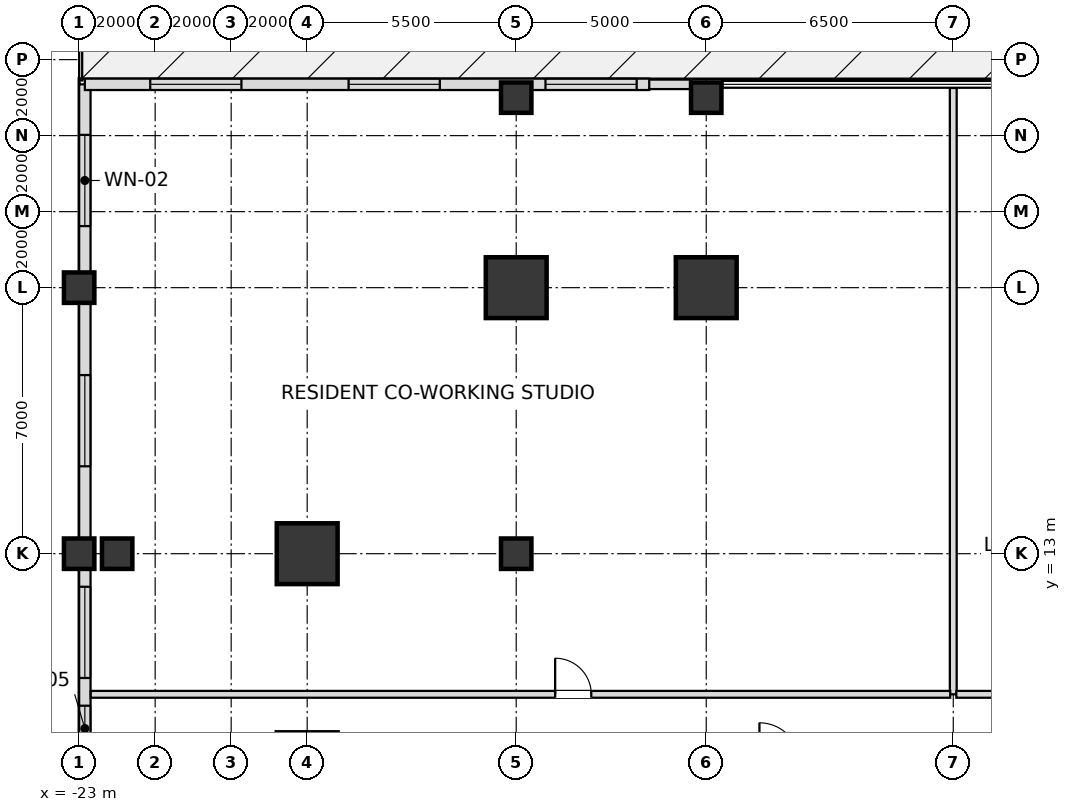
"""IFC4 building model, lengths in metres.
Left out: names, types, materials, properties, quantities, classifications, styles, units other than length and angle.
Written with IfcOpenShell. Run it as: python <this file> out.ifc"""

import sys

from ifc_helpers import new_model, si_unit, direction, frame, frame_2d, origin, origin_2d, place, context, subcontext, project, spatial, rectangle, extrude, element, fill, save


model = new_model("IFC4")
c1 = context("Model", 3, precision=1e-05, world=origin(), true_north=direction((0.0, 1.0)))
c2 = subcontext(c1, "Body", "Model", "MODEL_VIEW")
j1 = project(units=[si_unit("LENGTHUNIT", "METRE"), si_unit("PLANEANGLEUNIT", "RADIAN")], contexts=[c1])
p1 = place(None, origin())
s1 = spatial("IfcSite", under=j1, at=p1, CompositionType="ELEMENT")
p2 = place(p1, origin())
s2 = spatial("IfcBuilding", under=s1, at=p2, CompositionType="ELEMENT")
p3 = place(p2, frame((0.0, 0.0, 6.0)))
s3 = spatial("IfcBuildingStorey", under=s2, at=p3, CompositionType="ELEMENT", Elevation=6.0)
for number, where, z_axis, x_axis in (
    (1, (-6.5, 20.0, 0.0), (0.0, 0.0, 1.0), (1.0, 0.0, 0.0)),
    (2, (-11.5, 20.0, 0.0), (0.0, 0.0, 1.0), (1.0, 0.0, 0.0)),
    (3, (-17.0, 13.0, 0.0), (0.0, 0.0, 1.0), (1.0, 0.0, 0.0)),
):
    element("IfcColumn", number, at=place(p3, frame(where, z_axis=z_axis, x_axis=x_axis)), inside=s3, PredefinedType="USERDEFINED", context=c2, shape_type="SweptSolid", body=[
        extrude(rectangle(XDim=1.6, YDim=1.6, at=origin_2d()), origin(), (0.0, 0.0, 1.0), 5.4),
    ])
for number, where, z_axis, x_axis in (
    (4, (-23.0, 13.0, 0.0), (0.0, 0.0, 1.0), (1.0, 0.0, 0.0)),
    (5, (-23.0, 20.0, 0.0), (0.0, 0.0, 1.0), (1.0, 0.0, 0.0)),
    (6, (-11.5, 13.0, 0.0), (0.0, 0.0, 1.0), (1.0, 0.0, 0.0)),
    (7, (-22.0, 13.0, 0.0), (0.0, 0.0, 1.0), (1.0, 0.0, 0.0)),
    (8, (-11.5, 25.0, 0.0), (0.0, 0.0, 1.0), (1.0, 0.0, 0.0)),
    (9, (-6.5, 25.0, 0.0), (0.0, 0.0, 1.0), (1.0, 0.0, 0.0)),
):
    element("IfcColumn", number, at=place(p3, frame(where, z_axis=z_axis, x_axis=x_axis)), inside=s3, PredefinedType="COLUMN", context=c2, shape_type="SweptSolid", body=[
        extrude(rectangle(XDim=0.8, YDim=0.8, at=origin_2d()), origin(), (0.0, 0.0, 1.0), 5.4),
    ])
p4 = place(p3, frame((-22.85, 25.35, 0.0), z_axis=(0.0, 0.0, 1.0), x_axis=(0.0, -1.0, 0.0)))
e10 = element("IfcWall", 10, at=p4, inside=s3, PredefinedType="SOLIDWALL", context=c2, shape_type="SweptSolid", body=[
    extrude(rectangle(XDim=50.7, YDim=0.3, at=frame_2d((25.35, 0.0))), origin(), (0.0, 0.0, 1.0), 4.476),
])
p5 = place(p4, frame((1.33, 0.0, 0.8)))
e11 = element("IfcOpeningElement", 11, at=p5, cuts=e10, PredefinedType="OPENING", context=c2, shape_type="SweptSolid", body=[
    extrude(rectangle(XDim=2.4, YDim=2.2, at=frame_2d((1.2, 1.1))), frame((0.0, 0.16, 0.0), z_axis=(0.0, -1.0, 0.0), x_axis=(1.0, 0.0, 0.0)), (0.0, 0.0, 1.0), 0.32),
])
p6 = place(p4, frame((7.65, 0.0, 0.8)))
e12 = element("IfcOpeningElement", 12, at=p6, cuts=e10, PredefinedType="OPENING", context=c2, shape_type="SweptSolid", body=[
    extrude(rectangle(XDim=2.4, YDim=2.2, at=frame_2d((1.2, 1.1))), frame((0.0, 0.16, 0.0), z_axis=(0.0, -1.0, 0.0), x_axis=(1.0, 0.0, 0.0)), (0.0, 0.0, 1.0), 0.32),
])
p7 = place(p4, frame((13.22, 0.0, 0.8)))
e13 = element("IfcOpeningElement", 13, at=p7, cuts=e10, PredefinedType="OPENING", context=c2, shape_type="SweptSolid", body=[
    extrude(rectangle(XDim=2.4, YDim=2.2, at=frame_2d((1.2, 1.1))), frame((0.0, 0.16, 0.0), z_axis=(0.0, -1.0, 0.0), x_axis=(1.0, 0.0, 0.0)), (0.0, 0.0, 1.0), 0.32),
])
p8 = place(p4, frame((16.35, 0.0, 0.72)))
e14 = element("IfcOpeningElement", 14, at=p8, cuts=e10, PredefinedType="OPENING", context=c2, shape_type="SweptSolid", body=[
    extrude(rectangle(XDim=1.2, YDim=1.68, at=frame_2d((0.6, 0.84))), frame((0.0, 0.16, 0.0), z_axis=(0.0, -1.0, 0.0), x_axis=(1.0, 0.0, 0.0)), (0.0, 0.0, 1.0), 0.32),
])
p9 = place(p4, frame((18.495, 0.0, 0.8)))
e15 = element("IfcOpeningElement", 15, at=p9, cuts=e10, PredefinedType="OPENING", context=c2, shape_type="SweptSolid", body=[
    extrude(rectangle(XDim=2.4, YDim=2.2, at=frame_2d((1.2, 1.1))), frame((0.0, 0.16, 0.0), z_axis=(0.0, -1.0, 0.0), x_axis=(1.0, 0.0, 0.0)), (0.0, 0.0, 1.0), 0.32),
])
p10 = place(p4, frame((21.865, 0.0, 0.8)))
e16 = element("IfcOpeningElement", 16, at=p10, cuts=e10, PredefinedType="OPENING", context=c2, shape_type="SweptSolid", body=[
    extrude(rectangle(XDim=2.4, YDim=2.2, at=frame_2d((1.2, 1.1))), frame((0.0, 0.16, 0.0), z_axis=(0.0, -1.0, 0.0), x_axis=(1.0, 0.0, 0.0)), (0.0, 0.0, 1.0), 0.32),
])
p11 = place(p4, frame((26.435, 0.0, 0.8)))
e17 = element("IfcOpeningElement", 17, at=p11, cuts=e10, PredefinedType="OPENING", context=c2, shape_type="SweptSolid", body=[
    extrude(rectangle(XDim=2.4, YDim=2.2, at=frame_2d((1.2, 1.1))), frame((0.0, 0.16, 0.0), z_axis=(0.0, -1.0, 0.0), x_axis=(1.0, 0.0, 0.0)), (0.0, 0.0, 1.0), 0.32),
])
p12 = place(p4, frame((29.805, 0.0, 0.8)))
e18 = element("IfcOpeningElement", 18, at=p12, cuts=e10, PredefinedType="OPENING", context=c2, shape_type="SweptSolid", body=[
    extrude(rectangle(XDim=2.4, YDim=2.2, at=frame_2d((1.2, 1.1))), frame((0.0, 0.16, 0.0), z_axis=(0.0, -1.0, 0.0), x_axis=(1.0, 0.0, 0.0)), (0.0, 0.0, 1.0), 0.32),
])
p13 = place(p4, frame((33.15, 0.0, 0.72)))
e19 = element("IfcOpeningElement", 19, at=p13, cuts=e10, PredefinedType="OPENING", context=c2, shape_type="SweptSolid", body=[
    extrude(rectangle(XDim=1.2, YDim=1.68, at=frame_2d((0.6, 0.84))), frame((0.0, 0.16, 0.0), z_axis=(0.0, -1.0, 0.0), x_axis=(1.0, 0.0, 0.0)), (0.0, 0.0, 1.0), 0.32),
])
p14 = place(p4, frame((35.08, 0.0, 0.8)))
e20 = element("IfcOpeningElement", 20, at=p14, cuts=e10, PredefinedType="OPENING", context=c2, shape_type="SweptSolid", body=[
    extrude(rectangle(XDim=2.4, YDim=2.2, at=frame_2d((1.2, 1.1))), frame((0.0, 0.16, 0.0), z_axis=(0.0, -1.0, 0.0), x_axis=(1.0, 0.0, 0.0)), (0.0, 0.0, 1.0), 0.32),
])
p15 = place(p4, frame((40.47, 0.0, 0.8)))
e21 = element("IfcOpeningElement", 21, at=p15, cuts=e10, PredefinedType="OPENING", context=c2, shape_type="SweptSolid", body=[
    extrude(rectangle(XDim=2.4, YDim=2.2, at=frame_2d((1.2, 1.1))), frame((0.0, 0.16, 0.0), z_axis=(0.0, -1.0, 0.0), x_axis=(1.0, 0.0, 0.0)), (0.0, 0.0, 1.0), 0.32),
])
p16 = place(p4, frame((46.97, 0.0, 0.8)))
e22 = element("IfcOpeningElement", 22, at=p16, cuts=e10, PredefinedType="OPENING", context=c2, shape_type="SweptSolid", body=[
    extrude(rectangle(XDim=2.4, YDim=2.2, at=frame_2d((1.2, 1.1))), frame((0.0, 0.16, 0.0), z_axis=(0.0, -1.0, 0.0), x_axis=(1.0, 0.0, 0.0)), (0.0, 0.0, 1.0), 0.32),
])
p17 = place(p3, frame((-6.895, 25.35, 0.0), z_axis=(0.0, 0.0, 1.0), x_axis=(-1.0, 0.0, 0.0)))
e23 = element("IfcWall", 23, at=p17, inside=s3, PredefinedType="SOLIDWALL", context=c2, shape_type="SweptSolid", body=[
    extrude(rectangle(XDim=1.13, YDim=0.25, at=frame_2d((0.565, 0.0))), origin(), (0.0, 0.0, 1.0), 4.476),
])
p18 = place(p3, frame((-22.85, 25.35, 0.0), z_axis=(0.0, 0.0, 1.0), x_axis=(1.0, 0.0, 0.0)))
e24 = element("IfcWall", 24, at=p18, inside=s3, PredefinedType="SOLIDWALL", context=c2, shape_type="SweptSolid", body=[
    extrude(rectangle(XDim=14.85, YDim=0.3, at=frame_2d((7.425, 0.0))), origin(), (0.0, 0.0, 1.0), 4.476),
])
p19 = place(p18, frame((1.72, 0.0, 0.8)))
e25 = element("IfcOpeningElement", 25, at=p19, cuts=e24, PredefinedType="OPENING", context=c2, shape_type="SweptSolid", body=[
    extrude(rectangle(XDim=2.4, YDim=2.2, at=frame_2d((1.2, 1.1))), frame((0.0, 0.16, 0.0), z_axis=(0.0, -1.0, 0.0), x_axis=(1.0, 0.0, 0.0)), (0.0, 0.0, 1.0), 0.32),
])
p20 = place(p18, frame((6.94, 0.0, 0.8)))
e26 = element("IfcOpeningElement", 26, at=p20, cuts=e24, PredefinedType="OPENING", context=c2, shape_type="SweptSolid", body=[
    extrude(rectangle(XDim=2.4, YDim=2.2, at=frame_2d((1.2, 1.1))), frame((0.0, 0.16, 0.0), z_axis=(0.0, -1.0, 0.0), x_axis=(1.0, 0.0, 0.0)), (0.0, 0.0, 1.0), 0.32),
])
p21 = place(p18, frame((12.12, 0.0, 0.8)))
e27 = element("IfcOpeningElement", 27, at=p21, cuts=e24, PredefinedType="OPENING", context=c2, shape_type="SweptSolid", body=[
    extrude(rectangle(XDim=2.4, YDim=2.2, at=frame_2d((1.2, 1.1))), frame((0.0, 0.16, 0.0), z_axis=(0.0, -1.0, 0.0), x_axis=(1.0, 0.0, 0.0)), (0.0, 0.0, 1.0), 0.32),
])
p22 = place(p3, frame((0.0, 9.3, 0.0), z_axis=(0.0, 0.0, 1.0), x_axis=(0.0, 1.0, 0.0)))
e28 = element("IfcWall", 28, at=p22, inside=s3, PredefinedType="PARTITIONING", context=c2, shape_type="SweptSolid", body=[
    extrude(rectangle(XDim=15.955, YDim=0.18, at=frame_2d((7.978, 0.0))), origin(), (0.0, 0.0, 1.0), 4.476),
])
p23 = place(p3, frame((-22.695, 9.3, 0.0), z_axis=(0.0, 0.0, 1.0), x_axis=(1.0, 0.0, 0.0)))
e29 = element("IfcWall", 29, at=p23, inside=s3, PredefinedType="PARTITIONING", context=c2, shape_type="SweptSolid", body=[
    extrude(rectangle(XDim=22.615, YDim=0.18, at=frame_2d((11.308, 0.0))), origin(), (0.0, 0.0, 1.0), 4.41),
])
p24 = place(p23, frame((12.22, 0.0, 0.0)))
e30 = element("IfcOpeningElement", 30, at=p24, cuts=e29, PredefinedType="OPENING", context=c2, shape_type="SweptSolid", body=[
    extrude(rectangle(XDim=0.95, YDim=2.15, at=frame_2d((0.475, 1.075))), frame((0.0, 0.1, 0.0), z_axis=(0.0, -1.0, 0.0), x_axis=(1.0, 0.0, 0.0)), (0.0, 0.0, 1.0), 0.2),
])
p25 = place(p3, frame((0.08, 9.3, 0.0), z_axis=(0.0, 0.0, 1.0), x_axis=(1.0, 0.0, 0.0)))
e31 = element("IfcWall", 31, at=p25, inside=s3, PredefinedType="PARTITIONING", context=c2, shape_type="SweptSolid", body=[
    extrude(rectangle(XDim=13.84, YDim=0.18, at=frame_2d((6.92, 0.0))), origin(), (0.0, 0.0, 1.0), 4.41),
])
p26 = place(p25, frame((6.445, 0.0, 0.0)))
e32 = element("IfcOpeningElement", 32, at=p26, cuts=e31, PredefinedType="OPENING", context=c2, shape_type="SweptSolid", body=[
    extrude(rectangle(XDim=0.95, YDim=2.15, at=frame_2d((0.475, 1.075))), frame((0.0, 0.1, 0.0), z_axis=(0.0, -1.0, 0.0), x_axis=(1.0, 0.0, 0.0)), (0.0, 0.0, 1.0), 0.2),
])
p27 = place(p5, origin())
e33 = element("IfcWindow", 33, at=p27, inside=s3, PartitioningType="SINGLE_PANEL", PredefinedType="WINDOW", context=c2, shape_type="SweptSolid", body=[
    extrude(rectangle(XDim=2.4, YDim=2.2, at=frame_2d((1.2, 1.1))), frame((0.0, 0.03, 0.0), z_axis=(0.0, -1.0, 0.0), x_axis=(1.0, 0.0, 0.0)), (0.0, 0.0, 1.0), 0.06),
])
fill(e11, e33)
p28 = place(p6, origin())
e34 = element("IfcWindow", 34, at=p28, inside=s3, PartitioningType="SINGLE_PANEL", PredefinedType="WINDOW", context=c2, shape_type="SweptSolid", body=[
    extrude(rectangle(XDim=2.4, YDim=2.2, at=frame_2d((1.2, 1.1))), frame((0.0, 0.03, 0.0), z_axis=(0.0, -1.0, 0.0), x_axis=(1.0, 0.0, 0.0)), (0.0, 0.0, 1.0), 0.06),
])
fill(e12, e34)
p29 = place(p7, origin())
e35 = element("IfcWindow", 35, at=p29, inside=s3, PartitioningType="SINGLE_PANEL", PredefinedType="WINDOW", context=c2, shape_type="SweptSolid", body=[
    extrude(rectangle(XDim=2.4, YDim=2.2, at=frame_2d((1.2, 1.1))), frame((0.0, 0.03, 0.0), z_axis=(0.0, -1.0, 0.0), x_axis=(1.0, 0.0, 0.0)), (0.0, 0.0, 1.0), 0.06),
])
fill(e13, e35)
p30 = place(p8, origin())
e36 = element("IfcWindow", 36, at=p30, inside=s3, PartitioningType="SINGLE_PANEL", PredefinedType="WINDOW", context=c2, shape_type="SweptSolid", body=[
    extrude(rectangle(XDim=1.2, YDim=1.68, at=frame_2d((0.6, 0.84))), frame((0.0, 0.03, 0.0), z_axis=(0.0, -1.0, 0.0), x_axis=(1.0, 0.0, 0.0)), (0.0, 0.0, 1.0), 0.06),
])
fill(e14, e36)
p31 = place(p19, origin())
e37 = element("IfcWindow", 37, at=p31, inside=s3, PartitioningType="SINGLE_PANEL", PredefinedType="WINDOW", context=c2, shape_type="SweptSolid", body=[
    extrude(rectangle(XDim=2.4, YDim=2.2, at=frame_2d((1.2, 1.1))), frame((0.0, 0.03, 0.0), z_axis=(0.0, -1.0, 0.0), x_axis=(1.0, 0.0, 0.0)), (0.0, 0.0, 1.0), 0.06),
])
fill(e25, e37)
p32 = place(p20, origin())
e38 = element("IfcWindow", 38, at=p32, inside=s3, PartitioningType="SINGLE_PANEL", PredefinedType="WINDOW", context=c2, shape_type="SweptSolid", body=[
    extrude(rectangle(XDim=2.4, YDim=2.2, at=frame_2d((1.2, 1.1))), frame((0.0, 0.03, 0.0), z_axis=(0.0, -1.0, 0.0), x_axis=(1.0, 0.0, 0.0)), (0.0, 0.0, 1.0), 0.06),
])
fill(e26, e38)
p33 = place(p21, origin())
e39 = element("IfcWindow", 39, at=p33, inside=s3, PartitioningType="SINGLE_PANEL", PredefinedType="WINDOW", context=c2, shape_type="SweptSolid", body=[
    extrude(rectangle(XDim=2.4, YDim=2.2, at=frame_2d((1.2, 1.1))), frame((0.0, 0.03, 0.0), z_axis=(0.0, -1.0, 0.0), x_axis=(1.0, 0.0, 0.0)), (0.0, 0.0, 1.0), 0.06),
])
fill(e27, e39)
p34 = place(p24, origin())
e40 = element("IfcDoor", 40, at=p34, inside=s3, OperationType="SINGLE_SWING_LEFT", PredefinedType="DOOR", context=c2, shape_type="SweptSolid", body=[
    extrude(rectangle(XDim=0.95, YDim=2.15, at=frame_2d((0.475, 1.075))), frame((0.0, 0.025, 0.0), z_axis=(0.0, -1.0, 0.0), x_axis=(1.0, 0.0, 0.0)), (0.0, 0.0, 1.0), 0.05),
])
fill(e30, e40)
save(model, sys.argv[1])
